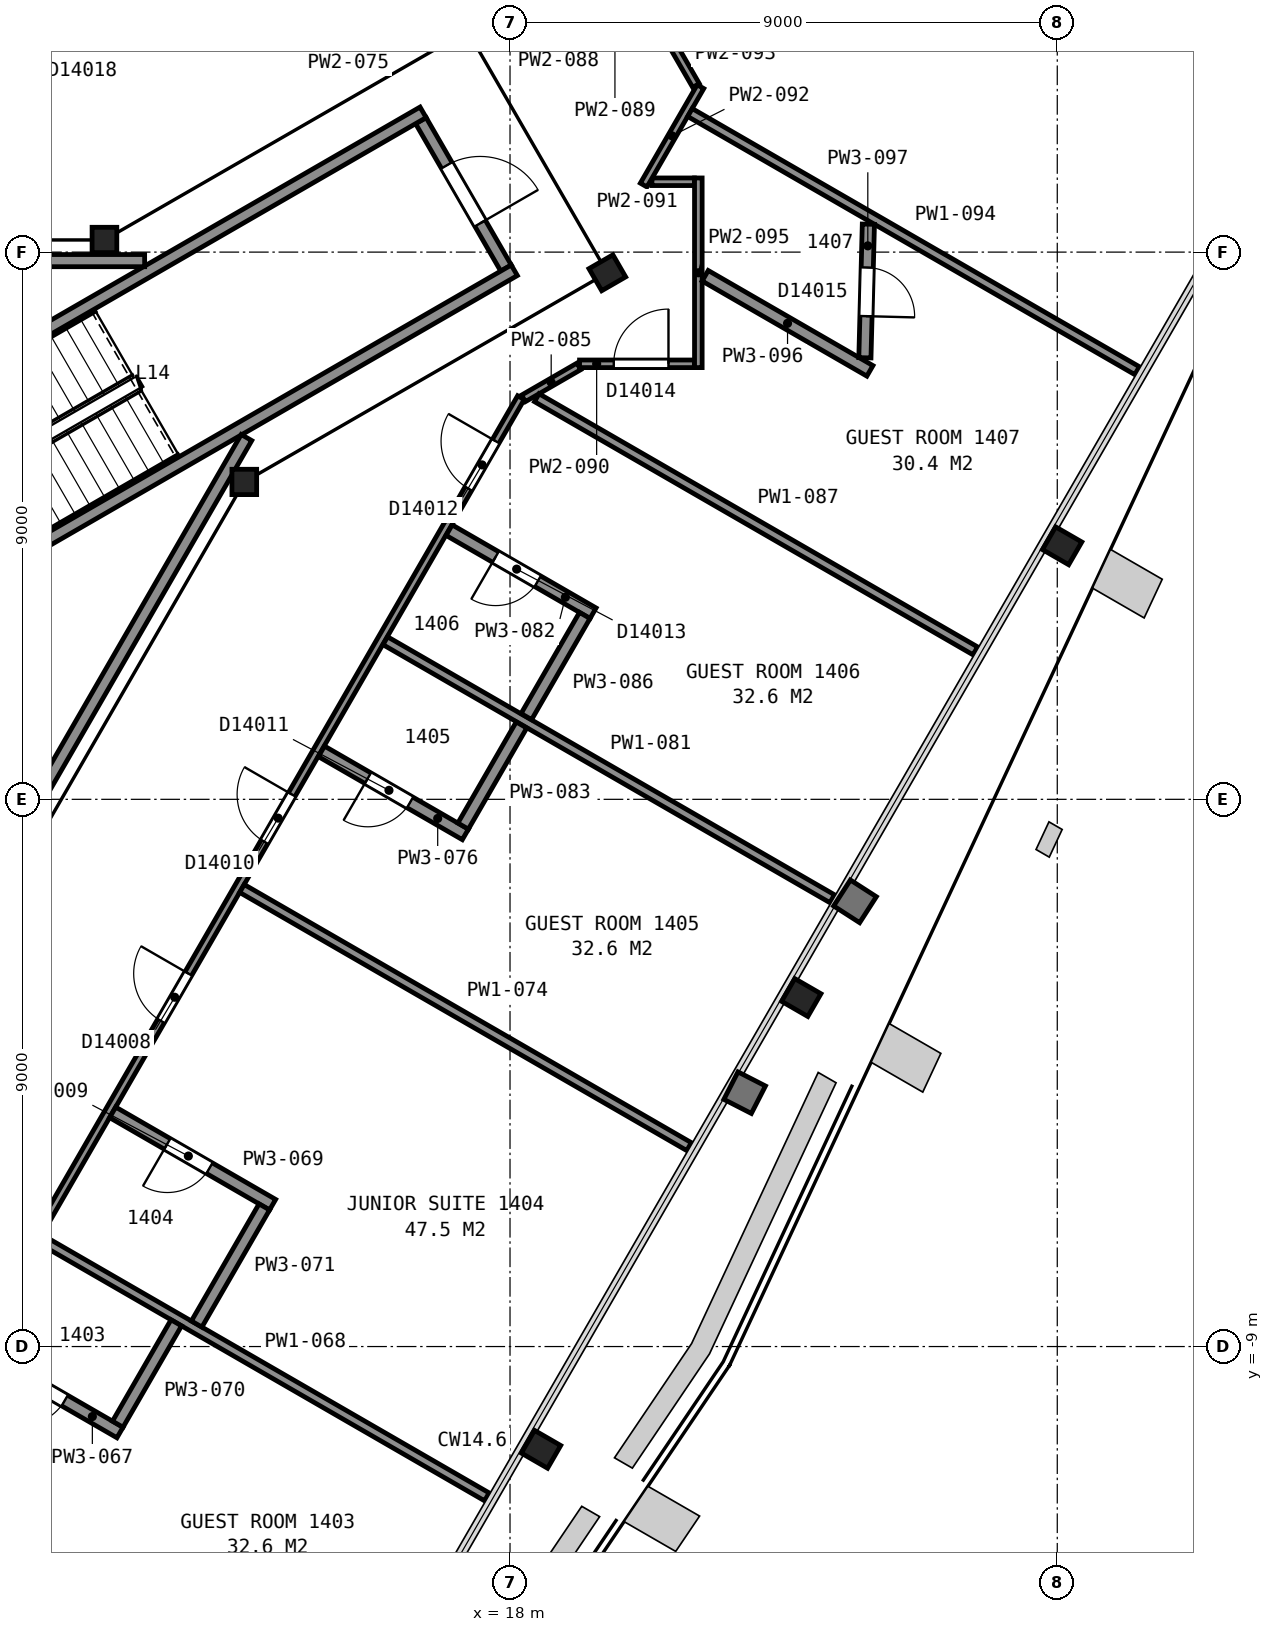
"""IFC4 building model, lengths in metres.
Left out: names, types, materials, properties, quantities, classifications, styles, units other than length and angle.
Written with IfcOpenShell. Run it as: python <this file> out.ifc"""

import sys

from ifc_helpers import new_model, si_unit, direction, frame, frame_2d, origin, origin_2d, place, context, subcontext, project, spatial, rectangle, i_section, extrude, element, fill, save


model = new_model("IFC4")
c1 = context("Model", 3, precision=1e-05, world=origin(), true_north=direction((0.0, 1.0)))
c2 = subcontext(c1, "Body", "Model", "MODEL_VIEW")
j1 = project(units=[si_unit("LENGTHUNIT", "METRE"), si_unit("PLANEANGLEUNIT", "RADIAN")], contexts=[c1])
p1 = place(None, origin())
s1 = spatial("IfcSite", under=j1, at=p1, CompositionType="ELEMENT")
p2 = place(p1, origin())
s2 = spatial("IfcBuilding", under=s1, at=p2, CompositionType="ELEMENT")
p3 = place(p2, frame((0.0, 0.0, 65.6)))
s3 = spatial("IfcBuildingStorey", under=s2, at=p3, CompositionType="ELEMENT", Elevation=65.6)
for number, where, z_axis, x_axis in (
    (1, (18.51, -10.69, 0.025), (0.0, 0.0, 1.0), (-0.5, -0.866, 0.0)),
    (2, (22.79, -3.26, 0.025), (0.0, 0.0, 1.0), (-0.5, -0.866, 0.0)),
    (3, (27.08, 4.17, 0.025), (0.0, 0.0, 1.0), (-0.5, -0.866, 0.0)),
):
    element("IfcColumn", number, at=place(p3, frame(where, z_axis=z_axis, x_axis=x_axis)), inside=s3, PredefinedType="COLUMN", context=c2, shape_type="SweptSolid", body=[
        extrude(i_section(OverallWidth=0.432, OverallDepth=0.498, WebThickness=0.056, FlangeThickness=0.089, FilletRadius=0.015, at=origin_2d()), origin(), (0.0, 0.0, 1.0), 3.575),
    ])
p4 = place(p3, frame((13.63, 5.22, 0.0), z_axis=(0.0, 0.0, 1.0), x_axis=(1.0, 0.0, 0.0)))
e4 = element("IfcColumn", 4, at=p4, inside=s3, PredefinedType="COLUMN", context=c2, shape_type="SweptSolid", body=[
    extrude(i_section(OverallWidth=0.406, OverallDepth=0.417, WebThickness=0.03, FlangeThickness=0.048, FilletRadius=0.015, at=origin_2d()), origin(), (0.0, 0.0, 1.0), 3.6),
])
p5 = place(p3, frame((19.6, 8.66, 0.0), z_axis=(0.0, 0.0, 1.0), x_axis=(0.5, -0.866025403784, 0.0)))
e5 = element("IfcColumn", 5, at=p5, inside=s3, PredefinedType="COLUMN", context=c2, shape_type="SweptSolid", body=[
    extrude(i_section(OverallWidth=0.419, OverallDepth=0.455, WebThickness=0.042, FlangeThickness=0.068, FilletRadius=0.015, at=origin_2d()), origin(), (0.0, 0.0, 1.0), 3.6),
])
p6 = place(p3, frame((11.33, 9.2, 0.0), z_axis=(0.0, 0.0, 1.0), x_axis=(1.0, 0.0, 0.0)))
e6 = element("IfcColumn", 6, at=p6, inside=s3, PredefinedType="COLUMN", context=c2, shape_type="SweptSolid", body=[
    extrude(i_section(OverallWidth=0.406, OverallDepth=0.417, WebThickness=0.03, FlangeThickness=0.048, FilletRadius=0.015, at=origin_2d()), origin(), (0.0, 0.0, 1.0), 3.6),
])
p7 = place(p3, frame((17.934, 8.738, 0.0), z_axis=(0.0, 0.0, 1.0), x_axis=(-0.49998411664, 0.866034573852, 0.0)))
e7 = element("IfcWall", 7, at=p7, inside=s3, PredefinedType="PARTITIONING", context=c2, shape_type="SweptSolid", body=[
    extrude(rectangle(XDim=2.8, YDim=0.2, at=frame_2d((1.4, 0.0))), origin(), (0.0, 0.0, 1.0), 3.35),
])
p8 = place(p7, frame((0.85, 0.0, 0.0)))
e8 = element("IfcOpeningElement", 8, at=p8, cuts=e7, PredefinedType="OPENING", context=c2, shape_type="SweptSolid", body=[
    extrude(rectangle(XDim=1.1, YDim=2.1, at=frame_2d((0.55, 1.05))), frame((0.0, 0.11, 0.0), z_axis=(0.0, -1.0, 0.0), x_axis=(1.0, 0.0, 0.0)), (0.0, 0.0, 1.0), 0.22),
])
for number, where, z_axis, x_axis in (
    (9, (6.178, 5.299, 0.0), (0.0, 0.0, 1.0), (0.866, 0.5, 0.0)),
    (10, (7.678, 2.701, 0.0), (0.0, 0.0, 1.0), (0.866, 0.5, 0.0)),
):
    element("IfcWall", number, at=place(p3, frame(where, z_axis=z_axis, x_axis=x_axis)), inside=s3, PredefinedType="PARTITIONING", context=c2, shape_type="SweptSolid", body=[
        extrude(rectangle(XDim=12.0, YDim=0.2, at=frame_2d((6.0, 0.0))), origin(), (0.0, 0.0, 1.0), 3.35),
    ])
p9 = place(p3, frame((6.177, 8.86, 0.0), z_axis=(0.0, 0.0, 1.0), x_axis=(1.0, 0.0, 0.0)))
e11 = element("IfcWall", 11, at=p9, inside=s3, PredefinedType="PARTITIONING", context=c2, shape_type="SweptSolid", body=[
    extrude(rectangle(XDim=5.814, YDim=0.2, at=frame_2d((2.907, 0.0))), origin(), (0.0, 0.0, 1.0), 3.35),
])
p10 = place(p3, frame((8.492, -3.012, 0.0), z_axis=(0.0, 0.0, 1.0), x_axis=(0.499972957231, 0.866041016371, 0.0)))
e12 = element("IfcWall", 12, at=p10, inside=s3, PredefinedType="PARTITIONING", context=c2, shape_type="SweptSolid", body=[
    extrude(rectangle(XDim=10.349, YDim=0.2, at=frame_2d((5.174, 0.0))), origin(), (0.0, 0.0, 1.0), 3.35),
])
p11 = place(p3, frame((18.179, 6.606, 0.0), z_axis=(0.0, 0.0, 1.0), x_axis=(-0.500003973642, -0.866023109589, 0.0)))
e13 = element("IfcWall", 13, at=p11, inside=s3, PredefinedType="PARTITIONING", context=c2, shape_type="SweptSolid", body=[
    extrude(rectangle(XDim=28.826, YDim=0.125, at=frame_2d((14.413, 0.0))), origin(), (0.0, 0.0, 1.0), 2.613),
])
p12 = place(p11, frame((21.501, 0.0, 0.0)))
e14 = element("IfcOpeningElement", 14, at=p12, cuts=e13, PredefinedType="OPENING", context=c2, shape_type="SweptSolid", body=[
    extrude(rectangle(XDim=0.9, YDim=2.1, at=frame_2d((0.45, 1.05))), frame((0.0, 0.073, 0.0), z_axis=(0.0, -1.0, 0.0), x_axis=(1.0, 0.0, 0.0)), (0.0, 0.0, 1.0), 0.145),
])
p13 = place(p11, frame((18.894, 0.0, 0.0)))
e15 = element("IfcOpeningElement", 15, at=p13, cuts=e13, PredefinedType="OPENING", context=c2, shape_type="SweptSolid", body=[
    extrude(rectangle(XDim=0.9, YDim=2.1, at=frame_2d((0.45, 1.05))), frame((0.0, 0.073, 0.0), z_axis=(0.0, -1.0, 0.0), x_axis=(1.0, 0.0, 0.0)), (0.0, 0.0, 1.0), 0.145),
])
p14 = place(p11, frame((10.937, 0.0, 0.0)))
e16 = element("IfcOpeningElement", 16, at=p14, cuts=e13, PredefinedType="OPENING", context=c2, shape_type="SweptSolid", body=[
    extrude(rectangle(XDim=0.9, YDim=2.1, at=frame_2d((0.45, 1.05))), frame((0.0, 0.073, 0.0), z_axis=(0.0, -1.0, 0.0), x_axis=(1.0, 0.0, 0.0)), (0.0, 0.0, 1.0), 0.145),
])
p15 = place(p11, frame((7.535, 0.0, 0.0)))
e17 = element("IfcOpeningElement", 17, at=p15, cuts=e13, PredefinedType="OPENING", context=c2, shape_type="SweptSolid", body=[
    extrude(rectangle(XDim=0.9, YDim=2.1, at=frame_2d((0.45, 1.05))), frame((0.0, 0.073, 0.0), z_axis=(0.0, -1.0, 0.0), x_axis=(1.0, 0.0, 0.0)), (0.0, 0.0, 1.0), 0.145),
])
p16 = place(p11, frame((0.827, 0.0, 0.0)))
e18 = element("IfcOpeningElement", 18, at=p16, cuts=e13, PredefinedType="OPENING", context=c2, shape_type="SweptSolid", body=[
    extrude(rectangle(XDim=0.9, YDim=2.1, at=frame_2d((0.45, 1.05))), frame((0.0, 0.073, 0.0), z_axis=(0.0, -1.0, 0.0), x_axis=(1.0, 0.0, 0.0)), (0.0, 0.0, 1.0), 0.145),
])
p17 = place(p3, frame((7.911, -11.303, 0.0), z_axis=(0.0, 0.0, 1.0), x_axis=(0.866012267213, -0.500022752519, 0.0)))
e19 = element("IfcWall", 19, at=p17, inside=s3, PredefinedType="PARTITIONING", context=c2, shape_type="SweptSolid", body=[
    extrude(rectangle(XDim=8.492, YDim=0.15, at=frame_2d((4.246, 0.0))), origin(), (0.0, 0.0, 1.0), 2.613),
])
p18 = place(p3, frame((9.215, -9.045, 0.0), z_axis=(0.0, 0.0, 1.0), x_axis=(0.865989529477, -0.500062130976, 0.0)))
e20 = element("IfcWall", 20, at=p18, inside=s3, PredefinedType="PARTITIONING", context=c2, shape_type="SweptSolid", body=[
    extrude(rectangle(XDim=2.738, YDim=0.2, at=frame_2d((1.369, 0.0))), origin(), (0.0, 0.0, 1.0), 2.613),
])
p19 = place(p18, frame((0.887, 0.0, 0.0)))
e21 = element("IfcOpeningElement", 21, at=p19, cuts=e20, PredefinedType="OPENING", context=c2, shape_type="SweptSolid", body=[
    extrude(rectangle(XDim=0.8, YDim=2.1, at=frame_2d((0.4, 1.05))), frame((0.0, 0.11, 0.0), z_axis=(0.0, -1.0, 0.0), x_axis=(1.0, 0.0, 0.0)), (0.0, 0.0, 1.0), 0.22),
])
p20 = place(p3, frame((10.265, -7.226, 0.0), z_axis=(0.0, 0.0, 1.0), x_axis=(0.866024716685, -0.500001190089, 0.0)))
e22 = element("IfcWall", 22, at=p20, inside=s3, PredefinedType="PARTITIONING", context=c2, shape_type="SweptSolid", body=[
    extrude(rectangle(XDim=8.492, YDim=0.15, at=frame_2d((4.246, 0.0))), origin(), (0.0, 0.0, 1.0), 2.613),
])
p21 = place(p3, frame((14.096, -6.667, 0.0), z_axis=(0.0, 0.0, 1.0), x_axis=(-0.866023634079, 0.500003065207, 0.0)))
e23 = element("IfcWall", 23, at=p21, inside=s3, PredefinedType="PARTITIONING", context=c2, shape_type="SweptSolid", body=[
    extrude(rectangle(XDim=3.038, YDim=0.2, at=frame_2d((1.519, 0.0))), origin(), (0.0, 0.0, 1.0), 2.613),
])
p22 = place(p21, frame((1.2, 0.0, 0.0)))
e24 = element("IfcOpeningElement", 24, at=p22, cuts=e23, PredefinedType="OPENING", context=c2, shape_type="SweptSolid", body=[
    extrude(rectangle(XDim=0.8, YDim=2.1, at=frame_2d((0.4, 1.05))), frame((0.0, 0.11, 0.0), z_axis=(0.0, -1.0, 0.0), x_axis=(1.0, 0.0, 0.0)), (0.0, 0.0, 1.0), 0.22),
])
p23 = place(p3, frame((11.549, -10.277, 0.0), z_axis=(0.0, 0.0, 1.0), x_axis=(0.499876134923, 0.86609690551, 0.0)))
e25 = element("IfcWall", 25, at=p23, inside=s3, PredefinedType="PARTITIONING", context=c2, shape_type="SweptSolid", body=[
    extrude(rectangle(XDim=1.925, YDim=0.2, at=frame_2d((0.963, 0.0))), origin(), (0.0, 0.0, 1.0), 2.613),
])
p24 = place(p3, frame((12.846, -8.63, 0.0), z_axis=(0.0, 0.0, 1.0), x_axis=(0.500092923031, 0.865971748, 0.0)))
e26 = element("IfcWall", 26, at=p24, inside=s3, PredefinedType="PARTITIONING", context=c2, shape_type="SweptSolid", body=[
    extrude(rectangle(XDim=2.225, YDim=0.2, at=frame_2d((1.112, 0.0))), origin(), (0.0, 0.0, 1.0), 2.613),
])
p25 = place(p3, frame((13.591, -1.466, 0.0), z_axis=(0.0, 0.0, 1.0), x_axis=(0.866022790583, -0.50000452617, 0.0)))
e27 = element("IfcWall", 27, at=p25, inside=s3, PredefinedType="PARTITIONING", context=c2, shape_type="SweptSolid", body=[
    extrude(rectangle(XDim=8.491, YDim=0.15, at=frame_2d((4.246, 0.0))), origin(), (0.0, 0.0, 1.0), 2.613),
])
p26 = place(p3, frame((14.898, 0.789, 0.0), z_axis=(0.0, 0.0, 1.0), x_axis=(0.866102295869, -0.499866795347, 0.0)))
e28 = element("IfcWall", 28, at=p26, inside=s3, PredefinedType="PARTITIONING", context=c2, shape_type="SweptSolid", body=[
    extrude(rectangle(XDim=2.733, YDim=0.2, at=frame_2d((1.367, 0.0))), origin(), (0.0, 0.0, 1.0), 2.613),
])
p27 = place(p26, frame((0.883, 0.0, 0.0)))
e29 = element("IfcOpeningElement", 29, at=p27, cuts=e28, PredefinedType="OPENING", context=c2, shape_type="SweptSolid", body=[
    extrude(rectangle(XDim=0.8, YDim=2.1, at=frame_2d((0.4, 1.05))), frame((0.0, 0.11, 0.0), z_axis=(0.0, -1.0, 0.0), x_axis=(1.0, 0.0, 0.0)), (0.0, 0.0, 1.0), 0.22),
])
p28 = place(p3, frame((15.948, 2.608, 0.0), z_axis=(0.0, 0.0, 1.0), x_axis=(0.866059124033, -0.499941590267, 0.0)))
e30 = element("IfcWall", 30, at=p28, inside=s3, PredefinedType="PARTITIONING", context=c2, shape_type="SweptSolid", body=[
    extrude(rectangle(XDim=8.487, YDim=0.15, at=frame_2d((4.243, 0.0))), origin(), (0.0, 0.0, 1.0), 2.613),
])
p29 = place(p3, frame((19.366, 3.061, 0.0), z_axis=(0.0, 0.0, 1.0), x_axis=(-0.866102295869, 0.499866795347, 0.0)))
e31 = element("IfcWall", 31, at=p29, inside=s3, PredefinedType="PARTITIONING", context=c2, shape_type="SweptSolid", body=[
    extrude(rectangle(XDim=2.733, YDim=0.2, at=frame_2d((1.367, 0.0))), origin(), (0.0, 0.0, 1.0), 2.613),
])
p30 = place(p29, frame((1.051, 0.0, 0.0)))
e32 = element("IfcOpeningElement", 32, at=p30, cuts=e31, PredefinedType="OPENING", context=c2, shape_type="SweptSolid", body=[
    extrude(rectangle(XDim=0.8, YDim=2.1, at=frame_2d((0.4, 1.05))), frame((0.0, 0.11, 0.0), z_axis=(0.0, -1.0, 0.0), x_axis=(1.0, 0.0, 0.0)), (0.0, 0.0, 1.0), 0.22),
])
p31 = place(p3, frame((17.229, -0.44, 0.0), z_axis=(0.0, 0.0, 1.0), x_axis=(0.499667418833, 0.866217334482, 0.0)))
e33 = element("IfcWall", 33, at=p31, inside=s3, PredefinedType="PARTITIONING", context=c2, shape_type="SweptSolid", body=[
    extrude(rectangle(XDim=1.92, YDim=0.2, at=frame_2d((0.96, 0.0))), origin(), (0.0, 0.0, 1.0), 2.613),
])
p32 = place(p3, frame((18.222, 6.594, 0.0), z_axis=(0.0, 0.0, 1.0), x_axis=(0.865876245925, 0.500258260045, 0.0)))
e34 = element("IfcWall", 34, at=p32, inside=s3, PredefinedType="PARTITIONING", context=c2, shape_type="SweptSolid", body=[
    extrude(rectangle(XDim=1.052, YDim=0.125, at=frame_2d((0.526, 0.0))), origin(), (0.0, 0.0, 1.0), 2.613),
])
p33 = place(p3, frame((18.269, 1.361, 0.0), z_axis=(0.0, 0.0, 1.0), x_axis=(0.499993829411, 0.866028966346, 0.0)))
e35 = element("IfcWall", 35, at=p33, inside=s3, PredefinedType="PARTITIONING", context=c2, shape_type="SweptSolid", body=[
    extrude(rectangle(XDim=1.921, YDim=0.2, at=frame_2d((0.96, 0.0))), origin(), (0.0, 0.0, 1.0), 2.613),
])
p34 = place(p3, frame((18.44, 6.605, 0.0), z_axis=(0.0, 0.0, 1.0), x_axis=(0.866044499518, -0.49996692376, 0.0)))
e36 = element("IfcWall", 36, at=p34, inside=s3, PredefinedType="PARTITIONING", context=c2, shape_type="SweptSolid", body=[
    extrude(rectangle(XDim=8.328, YDim=0.15, at=frame_2d((4.164, 0.0))), origin(), (0.0, 0.0, 1.0), 2.613),
])
p35 = place(p3, frame((21.032, 7.163, 0.0), z_axis=(0.0, 0.0, 1.0), x_axis=(-1.0, 0.0, 0.0)))
e37 = element("IfcWall", 37, at=p35, inside=s3, PredefinedType="PARTITIONING", context=c2, shape_type="SweptSolid", body=[
    extrude(rectangle(XDim=1.888, YDim=0.125, at=frame_2d((0.944, 0.0))), origin(), (0.0, 0.0, 1.0), 2.613),
])
p36 = place(p35, frame((0.426, 0.0, 0.0)))
e38 = element("IfcOpeningElement", 38, at=p36, cuts=e37, PredefinedType="OPENING", context=c2, shape_type="SweptSolid", body=[
    extrude(rectangle(XDim=0.9, YDim=2.1, at=frame_2d((0.45, 1.05))), frame((0.0, 0.073, 0.0), z_axis=(0.0, -1.0, 0.0), x_axis=(1.0, 0.0, 0.0)), (0.0, 0.0, 1.0), 0.145),
])
p37 = place(p3, frame((20.334, 10.157, 0.0), z_axis=(0.0, 0.0, 1.0), x_axis=(1.0, 0.0, 0.0)))
e39 = element("IfcWall", 39, at=p37, inside=s3, PredefinedType="PARTITIONING", context=c2, shape_type="SweptSolid", body=[
    extrude(rectangle(XDim=0.698, YDim=0.125, at=frame_2d((0.349, 0.0))), origin(), (0.0, 0.0, 1.0), 2.613),
])
p38 = place(p3, frame((20.198, 10.103, 0.0), z_axis=(0.0, 0.0, 1.0), x_axis=(0.500072997275, 0.865983254686, 0.0)))
e40 = element("IfcWall", 40, at=p38, inside=s3, PredefinedType="PARTITIONING", context=c2, shape_type="SweptSolid", body=[
    extrude(rectangle(XDim=1.869, YDim=0.125, at=frame_2d((0.935, 0.0))), origin(), (0.0, 0.0, 1.0), 2.613),
])
p39 = place(p3, frame((20.697, 12.367, 0.0), z_axis=(0.0, 0.0, 1.0), x_axis=(0.500238258503, -0.865887801468, 0.0)))
e41 = element("IfcWall", 41, at=p39, inside=s3, PredefinedType="PARTITIONING", context=c2, shape_type="SweptSolid", body=[
    extrude(rectangle(XDim=0.724, YDim=0.125, at=frame_2d((0.362, 0.0))), origin(), (0.0, 0.0, 1.0), 2.613),
])
p40 = place(p3, frame((20.959, 11.296, 0.0), z_axis=(0.0, 0.0, 1.0), x_axis=(0.866022790583, -0.50000452617, 0.0)))
e42 = element("IfcWall", 42, at=p40, inside=s3, PredefinedType="PARTITIONING", context=c2, shape_type="SweptSolid", body=[
    extrude(rectangle(XDim=8.491, YDim=0.15, at=frame_2d((4.246, 0.0))), origin(), (0.0, 0.0, 1.0), 2.613),
])
p41 = place(p3, frame((21.097, 7.101, 0.0), z_axis=(0.0, 0.0, 1.0), x_axis=(0.0, 1.0, 0.0)))
e43 = element("IfcWall", 43, at=p41, inside=s3, PredefinedType="PARTITIONING", context=c2, shape_type="SweptSolid", body=[
    extrude(rectangle(XDim=3.119, YDim=0.125, at=frame_2d((1.56, 0.0))), origin(), (0.0, 0.0, 1.0), 2.613),
])
p42 = place(p3, frame((21.209, 8.611, 0.0), z_axis=(0.0, 0.0, 1.0), x_axis=(0.866054327916, -0.499949898588, 0.0)))
e44 = element("IfcWall", 44, at=p42, inside=s3, PredefinedType="PARTITIONING", context=c2, shape_type="SweptSolid", body=[
    extrude(rectangle(XDim=3.128, YDim=0.2, at=frame_2d((1.564, 0.0))), origin(), (0.0, 0.0, 1.0), 2.613),
])
p43 = place(p3, frame((23.836, 7.262, 0.0), z_axis=(0.0, 0.0, 1.0), x_axis=(0.025988330811, 0.999662246292, 0.0)))
e45 = element("IfcWall", 45, at=p43, inside=s3, PredefinedType="PARTITIONING", context=c2, shape_type="SweptSolid", body=[
    extrude(rectangle(XDim=2.198, YDim=0.2, at=frame_2d((1.099, 0.0))), origin(), (0.0, 0.0, 1.0), 2.613),
])
p44 = place(p43, frame((0.685, 0.0, 0.0)))
e46 = element("IfcOpeningElement", 46, at=p44, cuts=e45, PredefinedType="OPENING", context=c2, shape_type="SweptSolid", body=[
    extrude(rectangle(XDim=0.8, YDim=2.1, at=frame_2d((0.4, 1.05))), frame((0.0, 0.11, 0.0), z_axis=(0.0, -1.0, 0.0), x_axis=(1.0, 0.0, 0.0)), (0.0, 0.0, 1.0), 0.22),
])
p45 = place(p8, origin())
e47 = element("IfcDoor", 47, at=p45, inside=s3, OperationType="SINGLE_SWING_LEFT", PredefinedType="DOOR", context=c2, shape_type="SweptSolid", body=[
    extrude(rectangle(XDim=1.1, YDim=2.1, at=frame_2d((0.55, 1.05))), frame((0.0, 0.025, 0.0), z_axis=(0.0, -1.0, 0.0), x_axis=(1.0, 0.0, 0.0)), (0.0, 0.0, 1.0), 0.05),
])
fill(e8, e47)
p46 = place(p14, origin())
e48 = element("IfcDoor", 48, at=p46, inside=s3, OperationType="SINGLE_SWING_LEFT", PredefinedType="DOOR", context=c2, shape_type="SweptSolid", body=[
    extrude(rectangle(XDim=0.9, YDim=2.1, at=frame_2d((0.45, 1.05))), frame((0.0, 0.025, 0.0), z_axis=(0.0, -1.0, 0.0), x_axis=(1.0, 0.0, 0.0)), (0.0, 0.0, 1.0), 0.05),
])
fill(e16, e48)
p47 = place(p15, origin())
e49 = element("IfcDoor", 49, at=p47, inside=s3, OperationType="SINGLE_SWING_LEFT", PredefinedType="DOOR", context=c2, shape_type="SweptSolid", body=[
    extrude(rectangle(XDim=0.9, YDim=2.1, at=frame_2d((0.45, 1.05))), frame((0.0, 0.025, 0.0), z_axis=(0.0, -1.0, 0.0), x_axis=(1.0, 0.0, 0.0)), (0.0, 0.0, 1.0), 0.05),
])
fill(e17, e49)
p48 = place(p16, origin())
e50 = element("IfcDoor", 50, at=p48, inside=s3, OperationType="SINGLE_SWING_LEFT", PredefinedType="DOOR", context=c2, shape_type="SweptSolid", body=[
    extrude(rectangle(XDim=0.9, YDim=2.1, at=frame_2d((0.45, 1.05))), frame((0.0, 0.025, 0.0), z_axis=(0.0, -1.0, 0.0), x_axis=(1.0, 0.0, 0.0)), (0.0, 0.0, 1.0), 0.05),
])
fill(e18, e50)
p49 = place(p19, origin())
e51 = element("IfcDoor", 51, at=p49, inside=s3, OperationType="SINGLE_SWING_LEFT", PredefinedType="DOOR", context=c2, shape_type="SweptSolid", body=[
    extrude(rectangle(XDim=0.8, YDim=2.1, at=frame_2d((0.4, 1.05))), frame((0.0, 0.025, 0.0), z_axis=(0.0, -1.0, 0.0), x_axis=(1.0, 0.0, 0.0)), (0.0, 0.0, 1.0), 0.05),
])
fill(e21, e51)
p50 = place(p22, origin())
e52 = element("IfcDoor", 52, at=p50, inside=s3, OperationType="SINGLE_SWING_RIGHT", PredefinedType="DOOR", context=c2, shape_type="SweptSolid", body=[
    extrude(rectangle(XDim=0.8, YDim=2.1, at=frame_2d((0.4, 1.05))), frame((0.0, 0.025, 0.0), z_axis=(0.0, -1.0, 0.0), x_axis=(1.0, 0.0, 0.0)), (0.0, 0.0, 1.0), 0.05),
])
fill(e24, e52)
p51 = place(p27, origin())
e53 = element("IfcDoor", 53, at=p51, inside=s3, OperationType="SINGLE_SWING_LEFT", PredefinedType="DOOR", context=c2, shape_type="SweptSolid", body=[
    extrude(rectangle(XDim=0.8, YDim=2.1, at=frame_2d((0.4, 1.05))), frame((0.0, 0.025, 0.0), z_axis=(0.0, -1.0, 0.0), x_axis=(1.0, 0.0, 0.0)), (0.0, 0.0, 1.0), 0.05),
])
fill(e29, e53)
p52 = place(p30, origin())
e54 = element("IfcDoor", 54, at=p52, inside=s3, OperationType="SINGLE_SWING_RIGHT", PredefinedType="DOOR", context=c2, shape_type="SweptSolid", body=[
    extrude(rectangle(XDim=0.8, YDim=2.1, at=frame_2d((0.4, 1.05))), frame((0.0, 0.025, 0.0), z_axis=(0.0, -1.0, 0.0), x_axis=(1.0, 0.0, 0.0)), (0.0, 0.0, 1.0), 0.05),
])
fill(e32, e54)
p53 = place(p36, origin())
e55 = element("IfcDoor", 55, at=p53, inside=s3, OperationType="SINGLE_SWING_LEFT", PredefinedType="DOOR", context=c2, shape_type="SweptSolid", body=[
    extrude(rectangle(XDim=0.9, YDim=2.1, at=frame_2d((0.45, 1.05))), frame((0.0, 0.025, 0.0), z_axis=(0.0, -1.0, 0.0), x_axis=(1.0, 0.0, 0.0)), (0.0, 0.0, 1.0), 0.05),
])
fill(e38, e55)
p54 = place(p44, origin())
e56 = element("IfcDoor", 56, at=p54, inside=s3, OperationType="SINGLE_SWING_LEFT", PredefinedType="DOOR", context=c2, shape_type="SweptSolid", body=[
    extrude(rectangle(XDim=0.8, YDim=2.1, at=frame_2d((0.4, 1.05))), frame((0.0, 0.025, 0.0), z_axis=(0.0, -1.0, 0.0), x_axis=(1.0, 0.0, 0.0)), (0.0, 0.0, 1.0), 0.05),
])
fill(e46, e56)
save(model, sys.argv[1])
